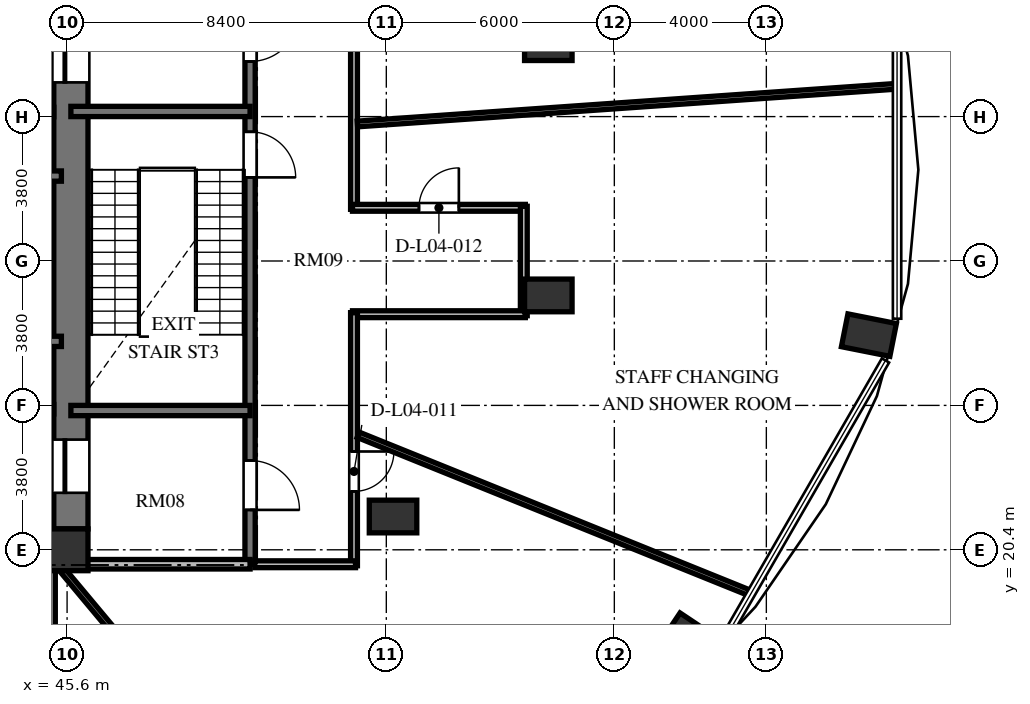
"""IFC4 building model, lengths in metres.
Left out: names, types, materials, properties, quantities, classifications, styles, units other than length and angle.
Written with IfcOpenShell. Run it as: python <this file> out.ifc"""

import sys

from ifc_helpers import new_model, si_unit, direction, frame, frame_2d, origin, origin_2d, place, context, subcontext, project, spatial, rectangle, extrude, element, fill, save


model = new_model("IFC4")
c1 = context("Model", 3, precision=1e-05, world=origin(), true_north=direction((0.0, 1.0)))
c2 = subcontext(c1, "Body", "Model", "MODEL_VIEW")
j1 = project(units=[si_unit("LENGTHUNIT", "METRE"), si_unit("PLANEANGLEUNIT", "RADIAN")], contexts=[c1])
p1 = place(None, origin())
s1 = spatial("IfcSite", under=j1, at=p1, CompositionType="ELEMENT")
p2 = place(p1, origin())
s2 = spatial("IfcBuilding", under=s1, at=p2, CompositionType="ELEMENT")
p3 = place(p2, frame((0.0, 0.0, 20.4)))
s3 = spatial("IfcBuildingStorey", under=s2, at=p3, CompositionType="ELEMENT", Elevation=20.4)
for number, where, z_axis, x_axis in (
    (1, (62.025, 18.011, 0.0), (0.0, 0.0, 1.0), (0.831, -0.556, 0.0)),
    (2, (66.698, 26.05, 0.0), (0.0, 0.0, 1.0), (0.981, -0.195, 0.0)),
):
    element("IfcColumn", number, at=place(p3, frame(where, z_axis=z_axis, x_axis=x_axis)), inside=s3, PredefinedType="COLUMN", context=c2, shape_type="SweptSolid", body=[
        extrude(rectangle(XDim=1.3, YDim=0.88, at=origin_2d()), origin(), (0.0, 0.0, 1.0), 4.8),
    ])
p4 = place(p3, frame((45.6, 20.4, 0.0), z_axis=(0.0, 0.0, 1.0), x_axis=(1.0, 0.0, 0.0)))
e3 = element("IfcColumn", 3, at=p4, inside=s3, PredefinedType="COLUMN", context=c2, shape_type="SweptSolid", body=[
    extrude(rectangle(XDim=1.1, YDim=1.1, at=origin_2d()), origin(), (0.0, 0.0, 1.0), 4.8),
])
for number, where, z_axis, x_axis in (
    (4, (54.177, 21.276, 0.0), (0.0, 0.0, 1.0), (1.0, 0.0, 0.0)),
    (5, (58.263, 27.094, 0.0), (0.0, 0.0, 1.0), (1.0, 0.0, 0.0)),
    (6, (58.263, 33.706, 0.0), (0.0, 0.0, 1.0), (1.0, 0.0, 0.0)),
):
    element("IfcColumn", number, at=place(p3, frame(where, z_axis=z_axis, x_axis=x_axis)), inside=s3, PredefinedType="COLUMN", context=c2, shape_type="SweptSolid", body=[
        extrude(rectangle(XDim=1.25, YDim=0.86, at=origin_2d()), origin(), (0.0, 0.0, 1.0), 4.8),
    ])
p5 = place(p3, frame((45.7, 20.95, 0.0), z_axis=(0.0, 0.0, 1.0), x_axis=(0.0, 1.0, 0.0)))
e7 = element("IfcWall", 7, at=p5, inside=s3, PredefinedType="SHEAR", context=c2, shape_type="SweptSolid", body=[
    extrude(rectangle(XDim=14.1, YDim=0.9, at=frame_2d((7.05, 0.0))), origin(), (0.0, 0.0, 1.0), 4.8),
])
p6 = place(p5, frame((11.75, 0.0, 0.0)))
e8 = element("IfcOpeningElement", 8, at=p6, cuts=e7, PredefinedType="OPENING", context=c2, shape_type="SweptSolid", body=[
    extrude(rectangle(XDim=1.4, YDim=2.3, at=frame_2d((0.7, 1.15))), frame((0.0, 0.46, 0.0), z_axis=(0.0, -1.0, 0.0), x_axis=(1.0, 0.0, 0.0)), (0.0, 0.0, 1.0), 0.92),
])
p7 = place(p5, frame((0.95, 0.0, 0.0)))
e9 = element("IfcOpeningElement", 9, at=p7, cuts=e7, PredefinedType="OPENING", context=c2, shape_type="SweptSolid", body=[
    extrude(rectangle(XDim=1.4, YDim=2.3, at=frame_2d((0.7, 1.15))), frame((0.0, 0.46, 0.0), z_axis=(0.0, -1.0, 0.0), x_axis=(1.0, 0.0, 0.0)), (0.0, 0.0, 1.0), 0.92),
])
p8 = place(p3, frame((37.465, 30.235, 0.0), z_axis=(0.0, 0.0, 1.0), x_axis=(1.0, 0.0, 0.0)))
e10 = element("IfcWall", 10, at=p8, inside=s3, PredefinedType="SHEAR", context=c2, shape_type="SweptSolid", body=[
    extrude(rectangle(XDim=7.985, YDim=0.27, at=frame_2d((3.992, 0.0))), origin(), (0.0, 0.0, 1.0), 4.8),
])
p9 = place(p8, frame((6.455, 0.0, 0.0)))
e11 = element("IfcOpeningElement", 11, at=p9, cuts=e10, PredefinedType="OPENING", context=c2, shape_type="SweptSolid", body=[
    extrude(rectangle(XDim=1.2, YDim=2.15, at=frame_2d((0.6, 1.075))), frame((0.0, 0.145, 0.0), z_axis=(0.0, -1.0, 0.0), x_axis=(1.0, 0.0, 0.0)), (0.0, 0.0, 1.0), 0.29),
])
p10 = place(p3, frame((37.465, 25.885, 0.0), z_axis=(0.0, 0.0, 1.0), x_axis=(1.0, 0.0, 0.0)))
e12 = element("IfcWall", 12, at=p10, inside=s3, PredefinedType="SHEAR", context=c2, shape_type="SweptSolid", body=[
    extrude(rectangle(XDim=7.985, YDim=0.27, at=frame_2d((3.992, 0.0))), origin(), (0.0, 0.0, 1.0), 4.8),
])
for number, where, z_axis, x_axis in (
    (13, (42.95, 31.92, 0.0), (0.0, 0.0, 1.0), (1.0, 0.0, 0.0)),
    (14, (42.95, 24.1, 0.0), (0.0, 0.0, 1.0), (1.0, 0.0, 0.0)),
):
    element("IfcWall", number, at=place(p3, frame(where, z_axis=z_axis, x_axis=x_axis)), inside=s3, PredefinedType="SOLIDWALL", context=c2, shape_type="SweptSolid", body=[
        extrude(rectangle(XDim=2.3, YDim=0.25, at=frame_2d((1.15, 0.0))), origin(), (0.0, 0.0, 1.0), 4.58),
    ])
p11 = place(p3, frame((50.415, 35.845, 0.0), z_axis=(0.0, 0.0, 1.0), x_axis=(0.0, -1.0, 0.0)))
e15 = element("IfcWall", 15, at=p11, inside=s3, PredefinedType="SHEAR", context=c2, shape_type="SweptSolid", body=[
    extrude(rectangle(XDim=15.825, YDim=0.27, at=frame_2d((7.913, 0.0))), origin(), (0.0, 0.0, 1.0), 4.8),
])
p12 = place(p11, frame((4.445, 0.0, 0.0)))
e16 = element("IfcOpeningElement", 16, at=p12, cuts=e15, PredefinedType="OPENING", context=c2, shape_type="SweptSolid", body=[
    extrude(rectangle(XDim=1.2, YDim=2.15, at=frame_2d((0.6, 1.075))), frame((0.0, 0.145, 0.0), z_axis=(0.0, -1.0, 0.0), x_axis=(1.0, 0.0, 0.0)), (0.0, 0.0, 1.0), 0.29),
])
p13 = place(p11, frame((1.295, 0.0, 0.0)))
e17 = element("IfcOpeningElement", 17, at=p13, cuts=e15, PredefinedType="OPENING", context=c2, shape_type="SweptSolid", body=[
    extrude(rectangle(XDim=1.3, YDim=2.2, at=frame_2d((0.65, 1.1))), frame((0.0, 0.145, 0.0), z_axis=(0.0, -1.0, 0.0), x_axis=(1.0, 0.0, 0.0)), (0.0, 0.0, 1.0), 0.29),
])
p14 = place(p11, frame((13.095, 0.0, 0.0)))
e18 = element("IfcOpeningElement", 18, at=p14, cuts=e15, PredefinedType="OPENING", context=c2, shape_type="SweptSolid", body=[
    extrude(rectangle(XDim=1.3, YDim=2.2, at=frame_2d((0.65, 1.1))), frame((0.0, 0.145, 0.0), z_axis=(0.0, -1.0, 0.0), x_axis=(1.0, 0.0, 0.0)), (0.0, 0.0, 1.0), 0.29),
])
for number, where, z_axis, x_axis in (
    (19, (45.7, 31.935, 0.0), (0.0, 0.0, 1.0), (1.0, 0.0, 0.0)),
    (20, (45.7, 24.065, 0.0), (0.0, 0.0, 1.0), (1.0, 0.0, 0.0)),
):
    element("IfcWall", number, at=place(p3, frame(where, z_axis=z_axis, x_axis=x_axis)), inside=s3, PredefinedType="SHEAR", context=c2, shape_type="SweptSolid", body=[
        extrude(rectangle(XDim=4.715, YDim=0.27, at=frame_2d((2.357, 0.0))), origin(), (0.0, 0.0, 1.0), 4.8),
    ])
p15 = place(p3, frame((45.7, 20.02, 0.0), z_axis=(0.0, 0.0, 1.0), x_axis=(1.0, 0.0, 0.0)))
e21 = element("IfcWall", 21, at=p15, inside=s3, PredefinedType="SOLIDWALL", context=c2, shape_type="SweptSolid", body=[
    extrude(rectangle(XDim=4.715, YDim=0.25, at=frame_2d((2.357, 0.0))), origin(), (0.0, 0.0, 1.0), 4.58),
])
p16 = place(p3, frame((53.15, 38.79, 0.0), z_axis=(0.0, 0.0, 1.0), x_axis=(0.0, -1.0, 0.0)))
e22 = element("IfcWall", 22, at=p16, inside=s3, PredefinedType="PARTITIONING", context=c2, shape_type="SweptSolid", body=[
    extrude(rectangle(XDim=9.43, YDim=0.18, at=frame_2d((4.715, 0.0))), origin(), (0.0, 0.0, 1.0), 4.265),
])
p17 = place(p16, frame((3.226, 0.0, 0.0)))
e23 = element("IfcOpeningElement", 23, at=p17, cuts=e22, PredefinedType="OPENING", context=c2, shape_type="SweptSolid", body=[
    extrude(rectangle(XDim=1.05, YDim=2.15, at=frame_2d((0.525, 1.075))), frame((0.0, 0.1, 0.0), z_axis=(0.0, -1.0, 0.0), x_axis=(1.0, 0.0, 0.0)), (0.0, 0.0, 1.0), 0.2),
])
p18 = place(p3, frame((53.11, 29.4, 0.0), z_axis=(0.0, 0.0, 1.0), x_axis=(1.0, 0.0, 0.0)))
e24 = element("IfcWall", 24, at=p18, inside=s3, PredefinedType="PARTITIONING", context=c2, shape_type="SweptSolid", body=[
    extrude(rectangle(XDim=4.548, YDim=0.18, at=frame_2d((2.274, 0.0))), origin(), (0.0, 0.0, 1.0), 4.58),
])
p19 = place(p18, frame((1.749, 0.0, 0.0)))
e25 = element("IfcOpeningElement", 25, at=p19, cuts=e24, PredefinedType="OPENING", context=c2, shape_type="SweptSolid", body=[
    extrude(rectangle(XDim=1.05, YDim=2.15, at=frame_2d((0.525, 1.075))), frame((0.0, 0.1, 0.0), z_axis=(0.0, -1.0, 0.0), x_axis=(1.0, 0.0, 0.0)), (0.0, 0.0, 1.0), 0.2),
])
p20 = place(p3, frame((57.618, 29.44, 0.0), z_axis=(0.0, 0.0, 1.0), x_axis=(0.0, -1.0, 0.0)))
e26 = element("IfcWall", 26, at=p20, inside=s3, PredefinedType="PARTITIONING", context=c2, shape_type="SweptSolid", body=[
    extrude(rectangle(XDim=2.88, YDim=0.18, at=frame_2d((1.44, 0.0))), origin(), (0.0, 0.0, 1.0), 4.58),
])
p21 = place(p3, frame((57.658, 26.6, 0.0), z_axis=(0.0, 0.0, 1.0), x_axis=(-1.0, 0.0, 0.0)))
e27 = element("IfcWall", 27, at=p21, inside=s3, PredefinedType="PARTITIONING", context=c2, shape_type="SweptSolid", body=[
    extrude(rectangle(XDim=4.548, YDim=0.18, at=frame_2d((2.274, 0.0))), origin(), (0.0, 0.0, 1.0), 4.58),
])
p22 = place(p3, frame((53.15, 26.64, 0.0), z_axis=(0.0, 0.0, 1.0), x_axis=(0.0, -1.0, 0.0)))
e28 = element("IfcWall", 28, at=p22, inside=s3, PredefinedType="PARTITIONING", context=c2, shape_type="SweptSolid", body=[
    extrude(rectangle(XDim=6.66, YDim=0.18, at=frame_2d((3.33, 0.0))), origin(), (0.0, 0.0, 1.0), 4.58),
])
p23 = place(p22, frame((3.653, 0.0, 0.0)))
e29 = element("IfcOpeningElement", 29, at=p23, cuts=e28, PredefinedType="OPENING", context=c2, shape_type="SweptSolid", body=[
    extrude(rectangle(XDim=1.05, YDim=2.15, at=frame_2d((0.525, 1.075))), frame((0.0, 0.1, 0.0), z_axis=(0.0, -1.0, 0.0), x_axis=(1.0, 0.0, 0.0)), (0.0, 0.0, 1.0), 0.2),
])
p24 = place(p3, frame((53.19, 20.02, 0.0), z_axis=(0.0, 0.0, 1.0), x_axis=(-1.0, 0.0, 0.0)))
e30 = element("IfcWall", 30, at=p24, inside=s3, PredefinedType="PARTITIONING", context=c2, shape_type="SweptSolid", body=[
    extrude(rectangle(XDim=2.65, YDim=0.18, at=frame_2d((1.325, 0.0))), origin(), (0.0, 0.0, 1.0), 4.58),
])
p25 = place(p3, frame((45.2, 19.91, 0.0), z_axis=(0.0, 0.0, 1.0), x_axis=(0.0, -1.0, 0.0)))
e31 = element("IfcWall", 31, at=p25, inside=s3, PredefinedType="PARTITIONING", context=c2, shape_type="SweptSolid", body=[
    extrude(rectangle(XDim=2.55, YDim=0.18, at=frame_2d((1.275, 0.0))), origin(), (0.0, 0.0, 1.0), 4.58),
])
p26 = place(p3, frame((45.407, 19.95, 0.0), z_axis=(0.0, 0.0, 1.0), x_axis=(0.641117276754, -0.767442921296, 0.0)))
e32 = element("IfcWall", 32, at=p26, inside=s3, PredefinedType="PARTITIONING", context=c2, shape_type="SweptSolid", body=[
    extrude(rectangle(XDim=11.681, YDim=0.15, at=frame_2d((5.84, 0.0))), origin(), (0.0, 0.0, 1.0), 3.165),
])
p27 = place(p3, frame((53.26, 23.426, 0.0), z_axis=(0.0, 0.0, 1.0), x_axis=(0.927183900085, -0.374606480754, 0.0)))
e33 = element("IfcWall", 33, at=p27, inside=s3, PredefinedType="PARTITIONING", context=c2, shape_type="SweptSolid", body=[
    extrude(rectangle(XDim=11.145, YDim=0.15, at=frame_2d((5.572, 0.0))), origin(), (0.0, 0.0, 1.0), 4.58),
])
p28 = place(p3, frame((53.24, 31.605, 0.0), z_axis=(0.0, 0.0, 1.0), x_axis=(0.997563398333, 0.069765796107, 0.0)))
e34 = element("IfcWall", 34, at=p28, inside=s3, PredefinedType="PARTITIONING", context=c2, shape_type="SweptSolid", body=[
    extrude(rectangle(XDim=14.232, YDim=0.15, at=frame_2d((7.116, 0.0))), origin(), (0.0, 0.0, 1.0), 4.58),
])
p29 = place(p6, origin())
e35 = element("IfcDoor", 35, at=p29, inside=s3, OperationType="SLIDING_TO_LEFT", PredefinedType="DOOR", context=c2, shape_type="SweptSolid", body=[
    extrude(rectangle(XDim=1.4, YDim=2.3, at=frame_2d((0.7, 1.15))), frame((0.0, 0.025, 0.0), z_axis=(0.0, -1.0, 0.0), x_axis=(1.0, 0.0, 0.0)), (0.0, 0.0, 1.0), 0.05),
])
fill(e8, e35)
p30 = place(p7, origin())
e36 = element("IfcDoor", 36, at=p30, inside=s3, OperationType="SLIDING_TO_LEFT", PredefinedType="DOOR", context=c2, shape_type="SweptSolid", body=[
    extrude(rectangle(XDim=1.4, YDim=2.3, at=frame_2d((0.7, 1.15))), frame((0.0, 0.025, 0.0), z_axis=(0.0, -1.0, 0.0), x_axis=(1.0, 0.0, 0.0)), (0.0, 0.0, 1.0), 0.05),
])
fill(e9, e36)
p31 = place(p12, origin())
e37 = element("IfcDoor", 37, at=p31, inside=s3, OperationType="SINGLE_SWING_RIGHT", PredefinedType="DOOR", context=c2, shape_type="SweptSolid", body=[
    extrude(rectangle(XDim=1.2, YDim=2.15, at=frame_2d((0.6, 1.075))), frame((0.0, 0.025, 0.0), z_axis=(0.0, -1.0, 0.0), x_axis=(1.0, 0.0, 0.0)), (0.0, 0.0, 1.0), 0.05),
])
fill(e16, e37)
p32 = place(p13, origin())
e38 = element("IfcDoor", 38, at=p32, inside=s3, OperationType="SINGLE_SWING_LEFT", PredefinedType="DOOR", context=c2, shape_type="SweptSolid", body=[
    extrude(rectangle(XDim=1.3, YDim=2.2, at=frame_2d((0.65, 1.1))), frame((0.0, 0.025, 0.0), z_axis=(0.0, -1.0, 0.0), x_axis=(1.0, 0.0, 0.0)), (0.0, 0.0, 1.0), 0.05),
])
fill(e17, e38)
p33 = place(p14, origin())
e39 = element("IfcDoor", 39, at=p33, inside=s3, OperationType="SINGLE_SWING_RIGHT", PredefinedType="DOOR", context=c2, shape_type="SweptSolid", body=[
    extrude(rectangle(XDim=1.3, YDim=2.2, at=frame_2d((0.65, 1.1))), frame((0.0, 0.025, 0.0), z_axis=(0.0, -1.0, 0.0), x_axis=(1.0, 0.0, 0.0)), (0.0, 0.0, 1.0), 0.05),
])
fill(e18, e39)
p34 = place(p23, origin())
e40 = element("IfcDoor", 40, at=p34, inside=s3, OperationType="SINGLE_SWING_LEFT", PredefinedType="DOOR", context=c2, shape_type="SweptSolid", body=[
    extrude(rectangle(XDim=1.05, YDim=2.15, at=frame_2d((0.525, 1.075))), frame((0.0, 0.025, 0.0), z_axis=(0.0, -1.0, 0.0), x_axis=(1.0, 0.0, 0.0)), (0.0, 0.0, 1.0), 0.05),
])
fill(e29, e40)
p35 = place(p19, origin())
e41 = element("IfcDoor", 41, at=p35, inside=s3, OperationType="SINGLE_SWING_RIGHT", PredefinedType="DOOR", context=c2, shape_type="SweptSolid", body=[
    extrude(rectangle(XDim=1.05, YDim=2.15, at=frame_2d((0.525, 1.075))), frame((0.0, 0.025, 0.0), z_axis=(0.0, -1.0, 0.0), x_axis=(1.0, 0.0, 0.0)), (0.0, 0.0, 1.0), 0.05),
])
fill(e25, e41)
save(model, sys.argv[1])
